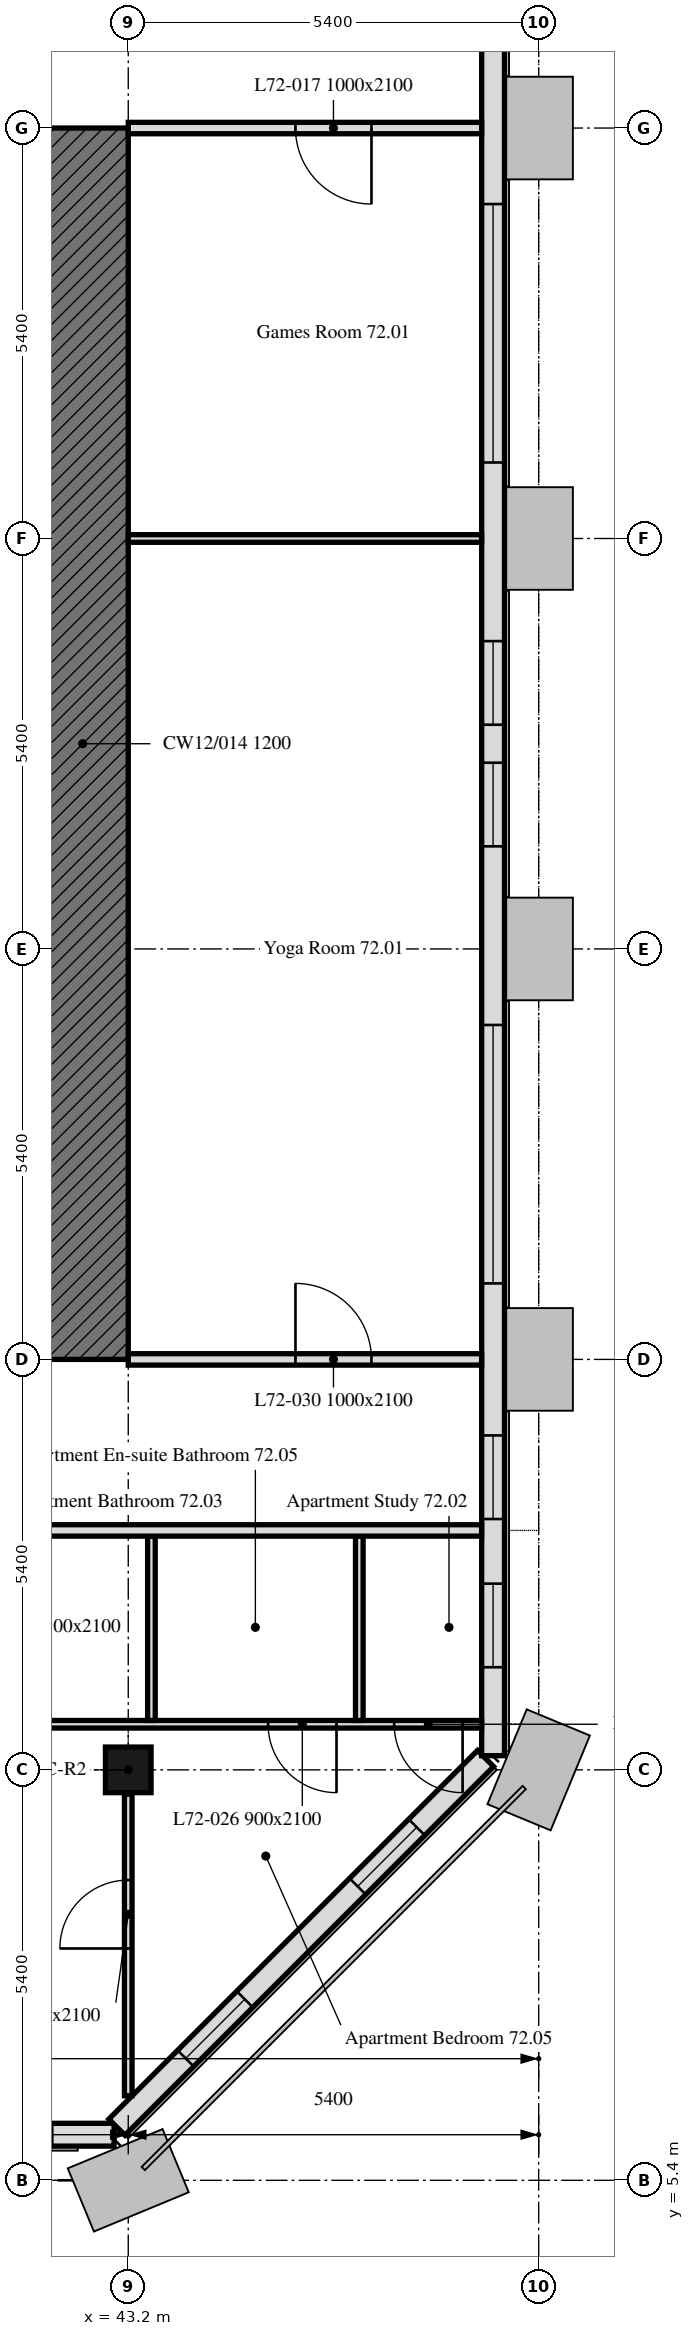
"""IFC4 building model, lengths in metres.
Left out: names, types, materials, properties, quantities, classifications, styles, units other than length and angle.
Written with IfcOpenShell. Run it as: python <this file> out.ifc"""

import sys

from ifc_helpers import new_model, si_unit, direction, frame, frame_2d, origin, origin_2d, place, context, subcontext, project, spatial, rectangle, extrude, element, fill, save


model = new_model("IFC4")
c1 = context("Model", 3, precision=1e-05, world=origin(), true_north=direction((0.0, 1.0)))
c2 = subcontext(c1, "Body", "Model", "MODEL_VIEW")
j1 = project(units=[si_unit("LENGTHUNIT", "METRE"), si_unit("PLANEANGLEUNIT", "RADIAN")], contexts=[c1])
p1 = place(None, origin())
s1 = spatial("IfcSite", under=j1, at=p1, CompositionType="ELEMENT")
p2 = place(p1, origin())
s2 = spatial("IfcBuilding", under=s1, at=p2, CompositionType="ELEMENT")
p3 = place(p2, frame((0.0, 0.0, 291.7)))
s3 = spatial("IfcBuildingStorey", under=s2, at=p3, CompositionType="ELEMENT", Elevation=291.7)
p4 = place(p3, frame((43.2, 10.8, 0.0), z_axis=(0.0, 0.0, 1.0), x_axis=(1.0, 0.0, 0.0)))
e1 = element("IfcColumn", 1, at=p4, inside=s3, PredefinedType="COLUMN", context=c2, shape_type="SweptSolid", body=[
    extrude(rectangle(XDim=0.6, YDim=0.6, at=origin_2d()), origin(), (0.0, 0.0, 1.0), 3.0),
])
p5 = place(p3, frame((10.986, 6.0, 0.0), z_axis=(0.0, 0.0, 1.0), x_axis=(1.0, 0.0, 0.0)))
e2 = element("IfcWall", 2, at=p5, inside=s3, PredefinedType="SOLIDWALL", context=c2, shape_type="SweptSolid", body=[
    extrude(rectangle(XDim=32.027, YDim=0.3, at=frame_2d((16.014, 0.0))), origin(), (0.0, 0.0, 1.0), 3.0),
])
p6 = place(p5, frame((2.764, 0.0, 0.9)))
e3 = element("IfcOpeningElement", 3, at=p6, cuts=e2, PredefinedType="OPENING", context=c2, shape_type="SweptSolid", body=[
    extrude(rectangle(XDim=1.1, YDim=1.7, at=frame_2d((0.55, 0.85))), frame((0.0, 0.16, 0.0), z_axis=(0.0, -1.0, 0.0), x_axis=(1.0, 0.0, 0.0)), (0.0, 0.0, 1.0), 0.32),
])
p7 = place(p5, frame((6.214, 0.0, 0.9)))
e4 = element("IfcOpeningElement", 4, at=p7, cuts=e2, PredefinedType="OPENING", context=c2, shape_type="SweptSolid", body=[
    extrude(rectangle(XDim=3.4, YDim=1.7, at=frame_2d((1.7, 0.85))), frame((0.0, 0.16, 0.0), z_axis=(0.0, -1.0, 0.0), x_axis=(1.0, 0.0, 0.0)), (0.0, 0.0, 1.0), 0.32),
])
p8 = place(p5, frame((13.564, 0.0, 0.9)))
e5 = element("IfcOpeningElement", 5, at=p8, cuts=e2, PredefinedType="OPENING", context=c2, shape_type="SweptSolid", body=[
    extrude(rectangle(XDim=1.1, YDim=1.7, at=frame_2d((0.55, 0.85))), frame((0.0, 0.16, 0.0), z_axis=(0.0, -1.0, 0.0), x_axis=(1.0, 0.0, 0.0)), (0.0, 0.0, 1.0), 0.32),
])
p9 = place(p5, frame((17.014, 0.0, 0.9)))
e6 = element("IfcOpeningElement", 6, at=p9, cuts=e2, PredefinedType="OPENING", context=c2, shape_type="SweptSolid", body=[
    extrude(rectangle(XDim=3.4, YDim=1.7, at=frame_2d((1.7, 0.85))), frame((0.0, 0.16, 0.0), z_axis=(0.0, -1.0, 0.0), x_axis=(1.0, 0.0, 0.0)), (0.0, 0.0, 1.0), 0.32),
])
p10 = place(p5, frame((24.364, 0.0, 0.9)))
e7 = element("IfcOpeningElement", 7, at=p10, cuts=e2, PredefinedType="OPENING", context=c2, shape_type="SweptSolid", body=[
    extrude(rectangle(XDim=1.1, YDim=1.7, at=frame_2d((0.55, 0.85))), frame((0.0, 0.16, 0.0), z_axis=(0.0, -1.0, 0.0), x_axis=(1.0, 0.0, 0.0)), (0.0, 0.0, 1.0), 0.32),
])
p11 = place(p5, frame((27.814, 0.0, 0.9)))
e8 = element("IfcOpeningElement", 8, at=p11, cuts=e2, PredefinedType="OPENING", context=c2, shape_type="SweptSolid", body=[
    extrude(rectangle(XDim=3.4, YDim=1.7, at=frame_2d((1.7, 0.85))), frame((0.0, 0.16, 0.0), z_axis=(0.0, -1.0, 0.0), x_axis=(1.0, 0.0, 0.0)), (0.0, 0.0, 1.0), 0.32),
])
p12 = place(p3, frame((43.051, 6.099, 0.0), z_axis=(0.0, 0.0, 1.0), x_axis=(0.707106781187, 0.707106781187, 0.0)))
e9 = element("IfcWall", 9, at=p12, inside=s3, PredefinedType="SOLIDWALL", context=c2, shape_type="SweptSolid", body=[
    extrude(rectangle(XDim=6.86, YDim=0.3, at=frame_2d((3.43, 0.0))), origin(), (0.0, 0.0, 1.0), 3.0),
])
p13 = place(p12, frame((1.28, 0.0, 0.9)))
e10 = element("IfcOpeningElement", 10, at=p13, cuts=e9, PredefinedType="OPENING", context=c2, shape_type="SweptSolid", body=[
    extrude(rectangle(XDim=1.1, YDim=1.7, at=frame_2d((0.55, 0.85))), frame((0.0, 0.16, 0.0), z_axis=(0.0, -1.0, 0.0), x_axis=(1.0, 0.0, 0.0)), (0.0, 0.0, 1.0), 0.32),
])
p14 = place(p12, frame((4.48, 0.0, 0.9)))
e11 = element("IfcOpeningElement", 11, at=p14, cuts=e9, PredefinedType="OPENING", context=c2, shape_type="SweptSolid", body=[
    extrude(rectangle(XDim=1.1, YDim=1.7, at=frame_2d((0.55, 0.85))), frame((0.0, 0.16, 0.0), z_axis=(0.0, -1.0, 0.0), x_axis=(1.0, 0.0, 0.0)), (0.0, 0.0, 1.0), 0.32),
])
p15 = place(p3, frame((48.0, 10.986, 0.0), z_axis=(0.0, 0.0, 1.0), x_axis=(0.0, 1.0, 0.0)))
e12 = element("IfcWall", 12, at=p15, inside=s3, PredefinedType="SOLIDWALL", context=c2, shape_type="SweptSolid", body=[
    extrude(rectangle(XDim=32.027, YDim=0.3, at=frame_2d((16.014, 0.0))), origin(), (0.0, 0.0, 1.0), 3.0),
])
p16 = place(p15, frame((1.164, 0.0, 0.9)))
e13 = element("IfcOpeningElement", 13, at=p16, cuts=e12, PredefinedType="OPENING", context=c2, shape_type="SweptSolid", body=[
    extrude(rectangle(XDim=1.1, YDim=1.7, at=frame_2d((0.55, 0.85))), frame((0.0, 0.16, 0.0), z_axis=(0.0, -1.0, 0.0), x_axis=(1.0, 0.0, 0.0)), (0.0, 0.0, 1.0), 0.32),
])
p17 = place(p15, frame((3.114, 0.0, 0.9)))
e14 = element("IfcOpeningElement", 14, at=p17, cuts=e12, PredefinedType="OPENING", context=c2, shape_type="SweptSolid", body=[
    extrude(rectangle(XDim=1.1, YDim=1.7, at=frame_2d((0.55, 0.85))), frame((0.0, 0.16, 0.0), z_axis=(0.0, -1.0, 0.0), x_axis=(1.0, 0.0, 0.0)), (0.0, 0.0, 1.0), 0.32),
])
p18 = place(p15, frame((6.214, 0.0, 0.9)))
e15 = element("IfcOpeningElement", 15, at=p18, cuts=e12, PredefinedType="OPENING", context=c2, shape_type="SweptSolid", body=[
    extrude(rectangle(XDim=3.4, YDim=1.7, at=frame_2d((1.7, 0.85))), frame((0.0, 0.16, 0.0), z_axis=(0.0, -1.0, 0.0), x_axis=(1.0, 0.0, 0.0)), (0.0, 0.0, 1.0), 0.32),
])
p19 = place(p15, frame((11.964, 0.0, 0.9)))
e16 = element("IfcOpeningElement", 16, at=p19, cuts=e12, PredefinedType="OPENING", context=c2, shape_type="SweptSolid", body=[
    extrude(rectangle(XDim=1.1, YDim=1.7, at=frame_2d((0.55, 0.85))), frame((0.0, 0.16, 0.0), z_axis=(0.0, -1.0, 0.0), x_axis=(1.0, 0.0, 0.0)), (0.0, 0.0, 1.0), 0.32),
])
p20 = place(p15, frame((13.564, 0.0, 0.9)))
e17 = element("IfcOpeningElement", 17, at=p20, cuts=e12, PredefinedType="OPENING", context=c2, shape_type="SweptSolid", body=[
    extrude(rectangle(XDim=1.1, YDim=1.7, at=frame_2d((0.55, 0.85))), frame((0.0, 0.16, 0.0), z_axis=(0.0, -1.0, 0.0), x_axis=(1.0, 0.0, 0.0)), (0.0, 0.0, 1.0), 0.32),
])
p21 = place(p15, frame((17.014, 0.0, 0.9)))
e18 = element("IfcOpeningElement", 18, at=p21, cuts=e12, PredefinedType="OPENING", context=c2, shape_type="SweptSolid", body=[
    extrude(rectangle(XDim=3.4, YDim=1.7, at=frame_2d((1.7, 0.85))), frame((0.0, 0.16, 0.0), z_axis=(0.0, -1.0, 0.0), x_axis=(1.0, 0.0, 0.0)), (0.0, 0.0, 1.0), 0.32),
])
p22 = place(p15, frame((22.839, 0.0, 0.9)))
e19 = element("IfcOpeningElement", 19, at=p22, cuts=e12, PredefinedType="OPENING", context=c2, shape_type="SweptSolid", body=[
    extrude(rectangle(XDim=0.65, YDim=1.7, at=frame_2d((0.325, 0.85))), frame((0.0, 0.16, 0.0), z_axis=(0.0, -1.0, 0.0), x_axis=(1.0, 0.0, 0.0)), (0.0, 0.0, 1.0), 0.32),
])
p23 = place(p15, frame((24.364, 0.0, 0.9)))
e20 = element("IfcOpeningElement", 20, at=p23, cuts=e12, PredefinedType="OPENING", context=c2, shape_type="SweptSolid", body=[
    extrude(rectangle(XDim=1.1, YDim=1.7, at=frame_2d((0.55, 0.85))), frame((0.0, 0.16, 0.0), z_axis=(0.0, -1.0, 0.0), x_axis=(1.0, 0.0, 0.0)), (0.0, 0.0, 1.0), 0.32),
])
p24 = place(p15, frame((28.164, 0.0, 0.9)))
e21 = element("IfcOpeningElement", 21, at=p24, cuts=e12, PredefinedType="OPENING", context=c2, shape_type="SweptSolid", body=[
    extrude(rectangle(XDim=1.1, YDim=1.7, at=frame_2d((0.55, 0.85))), frame((0.0, 0.16, 0.0), z_axis=(0.0, -1.0, 0.0), x_axis=(1.0, 0.0, 0.0)), (0.0, 0.0, 1.0), 0.32),
])
p25 = place(p15, frame((29.589, 0.0, 0.9)))
e22 = element("IfcOpeningElement", 22, at=p25, cuts=e12, PredefinedType="OPENING", context=c2, shape_type="SweptSolid", body=[
    extrude(rectangle(XDim=0.65, YDim=1.7, at=frame_2d((0.325, 0.85))), frame((0.0, 0.16, 0.0), z_axis=(0.0, -1.0, 0.0), x_axis=(1.0, 0.0, 0.0)), (0.0, 0.0, 1.0), 0.32),
])
p26 = place(p3, frame((42.6, 32.4, 0.0), z_axis=(0.0, 0.0, 1.0), x_axis=(0.0, -1.0, 0.0)))
e23 = element("IfcWall", 23, at=p26, inside=s3, PredefinedType="SOLIDWALL", context=c2, shape_type="SweptSolid", body=[
    extrude(rectangle(XDim=16.2, YDim=1.2, at=frame_2d((8.1, 0.0))), origin(), (0.0, 0.0, 1.0), 3.0),
])
p27 = place(p3, frame((47.849, 32.4, 0.0), z_axis=(0.0, 0.0, 1.0), x_axis=(-1.0, 0.0, 0.0)))
e24 = element("IfcWall", 24, at=p27, inside=s3, PredefinedType="PARTITIONING", context=c2, shape_type="SweptSolid", body=[
    extrude(rectangle(XDim=4.649, YDim=0.15, at=frame_2d((2.325, 0.0))), origin(), (0.0, 0.0, 1.0), 2.4),
])
p28 = place(p27, frame((1.449, 0.0, 0.0)))
e25 = element("IfcOpeningElement", 25, at=p28, cuts=e24, PredefinedType="OPENING", context=c2, shape_type="SweptSolid", body=[
    extrude(rectangle(XDim=1.0, YDim=2.1, at=frame_2d((0.5, 1.05))), frame((0.0, 0.075, 0.0), z_axis=(0.0, -1.0, 0.0), x_axis=(1.0, 0.0, 0.0)), (0.0, 0.0, 1.0), 0.15),
])
p29 = place(p3, frame((43.2, 27.0, 0.0), z_axis=(0.0, 0.0, 1.0), x_axis=(1.0, 0.0, 0.0)))
e26 = element("IfcWall", 26, at=p29, inside=s3, PredefinedType="PARTITIONING", context=c2, shape_type="SweptSolid", body=[
    extrude(rectangle(XDim=4.649, YDim=0.1, at=frame_2d((2.325, 0.0))), origin(), (0.0, 0.0, 1.0), 2.4),
])
p30 = place(p3, frame((43.2, 6.512, 0.0), z_axis=(0.0, 0.0, 1.0), x_axis=(0.0, 1.0, 0.0)))
e27 = element("IfcWall", 27, at=p30, inside=s3, PredefinedType="PARTITIONING", context=c2, shape_type="SweptSolid", body=[
    extrude(rectangle(XDim=3.968, YDim=0.1, at=frame_2d((1.984, 0.0))), origin(), (0.0, 0.0, 1.0), 3.0),
])
p31 = place(p30, frame((1.938, 0.0, 0.0)))
e28 = element("IfcOpeningElement", 28, at=p31, cuts=e27, PredefinedType="OPENING", context=c2, shape_type="SweptSolid", body=[
    extrude(rectangle(XDim=0.9, YDim=2.1, at=frame_2d((0.45, 1.05))), frame((0.0, 0.05, 0.0), z_axis=(0.0, -1.0, 0.0), x_axis=(1.0, 0.0, 0.0)), (0.0, 0.0, 1.0), 0.1),
])
p32 = place(p3, frame((47.849, 11.4, 0.0), z_axis=(0.0, 0.0, 1.0), x_axis=(-1.0, 0.0, 0.0)))
e29 = element("IfcWall", 29, at=p32, inside=s3, PredefinedType="PARTITIONING", context=c2, shape_type="SweptSolid", body=[
    extrude(rectangle(XDim=9.974, YDim=0.1, at=frame_2d((4.987, 0.0))), origin(), (0.0, 0.0, 1.0), 3.0),
])
p33 = place(p32, frame((1.909, 0.0, 0.0)))
e30 = element("IfcOpeningElement", 30, at=p33, cuts=e29, PredefinedType="OPENING", context=c2, shape_type="SweptSolid", body=[
    extrude(rectangle(XDim=0.9, YDim=2.1, at=frame_2d((0.45, 1.05))), frame((0.0, 0.05, 0.0), z_axis=(0.0, -1.0, 0.0), x_axis=(1.0, 0.0, 0.0)), (0.0, 0.0, 1.0), 0.1),
])
p34 = place(p32, frame((0.25, 0.0, 0.0)))
e31 = element("IfcOpeningElement", 31, at=p34, cuts=e29, PredefinedType="OPENING", context=c2, shape_type="SweptSolid", body=[
    extrude(rectangle(XDim=0.9, YDim=2.1, at=frame_2d((0.45, 1.05))), frame((0.0, 0.05, 0.0), z_axis=(0.0, -1.0, 0.0), x_axis=(1.0, 0.0, 0.0)), (0.0, 0.0, 1.0), 0.1),
])
p35 = place(p32, frame((7.474, 0.0, 0.0)))
e32 = element("IfcOpeningElement", 32, at=p35, cuts=e29, PredefinedType="OPENING", context=c2, shape_type="SweptSolid", body=[
    extrude(rectangle(XDim=0.9, YDim=2.1, at=frame_2d((0.45, 1.05))), frame((0.0, 0.05, 0.0), z_axis=(0.0, -1.0, 0.0), x_axis=(1.0, 0.0, 0.0)), (0.0, 0.0, 1.0), 0.1),
])
for number, where, z_axis, x_axis in (
    (33, (43.505, 11.45, 0.0), (0.0, 0.0, 1.0), (0.0, 1.0, 0.0)),
    (34, (46.24, 11.45, 0.0), (0.0, 0.0, 1.0), (0.0, 1.0, 0.0)),
):
    element("IfcWall", number, at=place(p3, frame(where, z_axis=z_axis, x_axis=x_axis)), inside=s3, PredefinedType="PARTITIONING", context=c2, shape_type="SweptSolid", body=[
        extrude(rectangle(XDim=2.425, YDim=0.1, at=frame_2d((1.212, 0.0))), origin(), (0.0, 0.0, 1.0), 3.0),
    ])
p36 = place(p3, frame((47.849, 13.95, 0.0), z_axis=(0.0, 0.0, 1.0), x_axis=(-1.0, 0.0, 0.0)))
e35 = element("IfcWall", 35, at=p36, inside=s3, PredefinedType="PARTITIONING", context=c2, shape_type="SweptSolid", body=[
    extrude(rectangle(XDim=41.698, YDim=0.15, at=frame_2d((20.849, 0.0))), origin(), (0.0, 0.0, 1.0), 3.0),
])
p37 = place(p36, frame((35.609, 0.0, 0.0)))
e36 = element("IfcOpeningElement", 36, at=p37, cuts=e35, PredefinedType="OPENING", context=c2, shape_type="SweptSolid", body=[
    extrude(rectangle(XDim=1.0, YDim=2.1, at=frame_2d((0.5, 1.05))), frame((0.0, 0.075, 0.0), z_axis=(0.0, -1.0, 0.0), x_axis=(1.0, 0.0, 0.0)), (0.0, 0.0, 1.0), 0.15),
])
p38 = place(p36, frame((22.354, 0.0, 0.0)))
e37 = element("IfcOpeningElement", 37, at=p38, cuts=e35, PredefinedType="OPENING", context=c2, shape_type="SweptSolid", body=[
    extrude(rectangle(XDim=1.0, YDim=2.1, at=frame_2d((0.5, 1.05))), frame((0.0, 0.075, 0.0), z_axis=(0.0, -1.0, 0.0), x_axis=(1.0, 0.0, 0.0)), (0.0, 0.0, 1.0), 0.15),
])
p39 = place(p36, frame((8.049, 0.0, 0.0)))
e38 = element("IfcOpeningElement", 38, at=p39, cuts=e35, PredefinedType="OPENING", context=c2, shape_type="SweptSolid", body=[
    extrude(rectangle(XDim=1.0, YDim=2.1, at=frame_2d((0.5, 1.05))), frame((0.0, 0.075, 0.0), z_axis=(0.0, -1.0, 0.0), x_axis=(1.0, 0.0, 0.0)), (0.0, 0.0, 1.0), 0.15),
])
p40 = place(p3, frame((43.2, 16.2, 0.0), z_axis=(0.0, 0.0, 1.0), x_axis=(1.0, 0.0, 0.0)))
e39 = element("IfcWall", 39, at=p40, inside=s3, PredefinedType="PARTITIONING", context=c2, shape_type="SweptSolid", body=[
    extrude(rectangle(XDim=4.649, YDim=0.15, at=frame_2d((2.325, 0.0))), origin(), (0.0, 0.0, 1.0), 2.4),
])
p41 = place(p40, frame((2.2, 0.0, 0.0)))
e40 = element("IfcOpeningElement", 40, at=p41, cuts=e39, PredefinedType="OPENING", context=c2, shape_type="SweptSolid", body=[
    extrude(rectangle(XDim=1.0, YDim=2.1, at=frame_2d((0.5, 1.05))), frame((0.0, 0.075, 0.0), z_axis=(0.0, -1.0, 0.0), x_axis=(1.0, 0.0, 0.0)), (0.0, 0.0, 1.0), 0.15),
])
p42 = place(p13, origin())
e41 = element("IfcWindow", 41, at=p42, inside=s3, PartitioningType="SINGLE_PANEL", PredefinedType="WINDOW", context=c2, shape_type="SweptSolid", body=[
    extrude(rectangle(XDim=1.1, YDim=1.7, at=frame_2d((0.55, 0.85))), frame((0.0, 0.03, 0.0), z_axis=(0.0, -1.0, 0.0), x_axis=(1.0, 0.0, 0.0)), (0.0, 0.0, 1.0), 0.06),
])
fill(e10, e41)
p43 = place(p14, origin())
e42 = element("IfcWindow", 42, at=p43, inside=s3, PartitioningType="SINGLE_PANEL", PredefinedType="WINDOW", context=c2, shape_type="SweptSolid", body=[
    extrude(rectangle(XDim=1.1, YDim=1.7, at=frame_2d((0.55, 0.85))), frame((0.0, 0.03, 0.0), z_axis=(0.0, -1.0, 0.0), x_axis=(1.0, 0.0, 0.0)), (0.0, 0.0, 1.0), 0.06),
])
fill(e11, e42)
p44 = place(p16, origin())
e43 = element("IfcWindow", 43, at=p44, inside=s3, PartitioningType="SINGLE_PANEL", PredefinedType="WINDOW", context=c2, shape_type="SweptSolid", body=[
    extrude(rectangle(XDim=1.1, YDim=1.7, at=frame_2d((0.55, 0.85))), frame((0.0, 0.03, 0.0), z_axis=(0.0, -1.0, 0.0), x_axis=(1.0, 0.0, 0.0)), (0.0, 0.0, 1.0), 0.06),
])
fill(e13, e43)
p45 = place(p17, origin())
e44 = element("IfcWindow", 44, at=p45, inside=s3, PartitioningType="SINGLE_PANEL", PredefinedType="WINDOW", context=c2, shape_type="SweptSolid", body=[
    extrude(rectangle(XDim=1.1, YDim=1.7, at=frame_2d((0.55, 0.85))), frame((0.0, 0.03, 0.0), z_axis=(0.0, -1.0, 0.0), x_axis=(1.0, 0.0, 0.0)), (0.0, 0.0, 1.0), 0.06),
])
fill(e14, e44)
p46 = place(p18, origin())
e45 = element("IfcWindow", 45, at=p46, inside=s3, PartitioningType="SINGLE_PANEL", PredefinedType="WINDOW", context=c2, shape_type="SweptSolid", body=[
    extrude(rectangle(XDim=3.4, YDim=1.7, at=frame_2d((1.7, 0.85))), frame((0.0, 0.03, 0.0), z_axis=(0.0, -1.0, 0.0), x_axis=(1.0, 0.0, 0.0)), (0.0, 0.0, 1.0), 0.06),
])
fill(e15, e45)
p47 = place(p19, origin())
e46 = element("IfcWindow", 46, at=p47, inside=s3, PartitioningType="SINGLE_PANEL", PredefinedType="WINDOW", context=c2, shape_type="SweptSolid", body=[
    extrude(rectangle(XDim=1.1, YDim=1.7, at=frame_2d((0.55, 0.85))), frame((0.0, 0.03, 0.0), z_axis=(0.0, -1.0, 0.0), x_axis=(1.0, 0.0, 0.0)), (0.0, 0.0, 1.0), 0.06),
])
fill(e16, e46)
p48 = place(p20, origin())
e47 = element("IfcWindow", 47, at=p48, inside=s3, PartitioningType="SINGLE_PANEL", PredefinedType="WINDOW", context=c2, shape_type="SweptSolid", body=[
    extrude(rectangle(XDim=1.1, YDim=1.7, at=frame_2d((0.55, 0.85))), frame((0.0, 0.03, 0.0), z_axis=(0.0, -1.0, 0.0), x_axis=(1.0, 0.0, 0.0)), (0.0, 0.0, 1.0), 0.06),
])
fill(e17, e47)
p49 = place(p21, origin())
e48 = element("IfcWindow", 48, at=p49, inside=s3, PartitioningType="SINGLE_PANEL", PredefinedType="WINDOW", context=c2, shape_type="SweptSolid", body=[
    extrude(rectangle(XDim=3.4, YDim=1.7, at=frame_2d((1.7, 0.85))), frame((0.0, 0.03, 0.0), z_axis=(0.0, -1.0, 0.0), x_axis=(1.0, 0.0, 0.0)), (0.0, 0.0, 1.0), 0.06),
])
fill(e18, e48)
p50 = place(p28, origin())
e49 = element("IfcDoor", 49, at=p50, inside=s3, OperationType="SINGLE_SWING_RIGHT", PredefinedType="DOOR", context=c2, shape_type="SweptSolid", body=[
    extrude(rectangle(XDim=1.0, YDim=2.1, at=frame_2d((0.5, 1.05))), frame((0.0, 0.025, 0.0), z_axis=(0.0, -1.0, 0.0), x_axis=(1.0, 0.0, 0.0)), (0.0, 0.0, 1.0), 0.05),
])
fill(e25, e49)
p51 = place(p33, origin())
e50 = element("IfcDoor", 50, at=p51, inside=s3, OperationType="SINGLE_SWING_RIGHT", PredefinedType="DOOR", context=c2, shape_type="SweptSolid", body=[
    extrude(rectangle(XDim=0.9, YDim=2.1, at=frame_2d((0.45, 1.05))), frame((0.0, 0.025, 0.0), z_axis=(0.0, -1.0, 0.0), x_axis=(1.0, 0.0, 0.0)), (0.0, 0.0, 1.0), 0.05),
])
fill(e30, e50)
p52 = place(p34, origin())
e51 = element("IfcDoor", 51, at=p52, inside=s3, OperationType="SINGLE_SWING_LEFT", PredefinedType="DOOR", context=c2, shape_type="SweptSolid", body=[
    extrude(rectangle(XDim=0.9, YDim=2.1, at=frame_2d((0.45, 1.05))), frame((0.0, 0.025, 0.0), z_axis=(0.0, -1.0, 0.0), x_axis=(1.0, 0.0, 0.0)), (0.0, 0.0, 1.0), 0.05),
])
fill(e31, e51)
p53 = place(p41, origin())
e52 = element("IfcDoor", 52, at=p53, inside=s3, OperationType="SINGLE_SWING_RIGHT", PredefinedType="DOOR", context=c2, shape_type="SweptSolid", body=[
    extrude(rectangle(XDim=1.0, YDim=2.1, at=frame_2d((0.5, 1.05))), frame((0.0, 0.025, 0.0), z_axis=(0.0, -1.0, 0.0), x_axis=(1.0, 0.0, 0.0)), (0.0, 0.0, 1.0), 0.05),
])
fill(e40, e52)
p54 = place(p31, origin())
e53 = element("IfcDoor", 53, at=p54, inside=s3, OperationType="SINGLE_SWING_LEFT", PredefinedType="DOOR", context=c2, shape_type="SweptSolid", body=[
    extrude(rectangle(XDim=0.9, YDim=2.1, at=frame_2d((0.45, 1.05))), frame((0.0, 0.025, 0.0), z_axis=(0.0, -1.0, 0.0), x_axis=(1.0, 0.0, 0.0)), (0.0, 0.0, 1.0), 0.05),
])
fill(e28, e53)
save(model, sys.argv[1])
